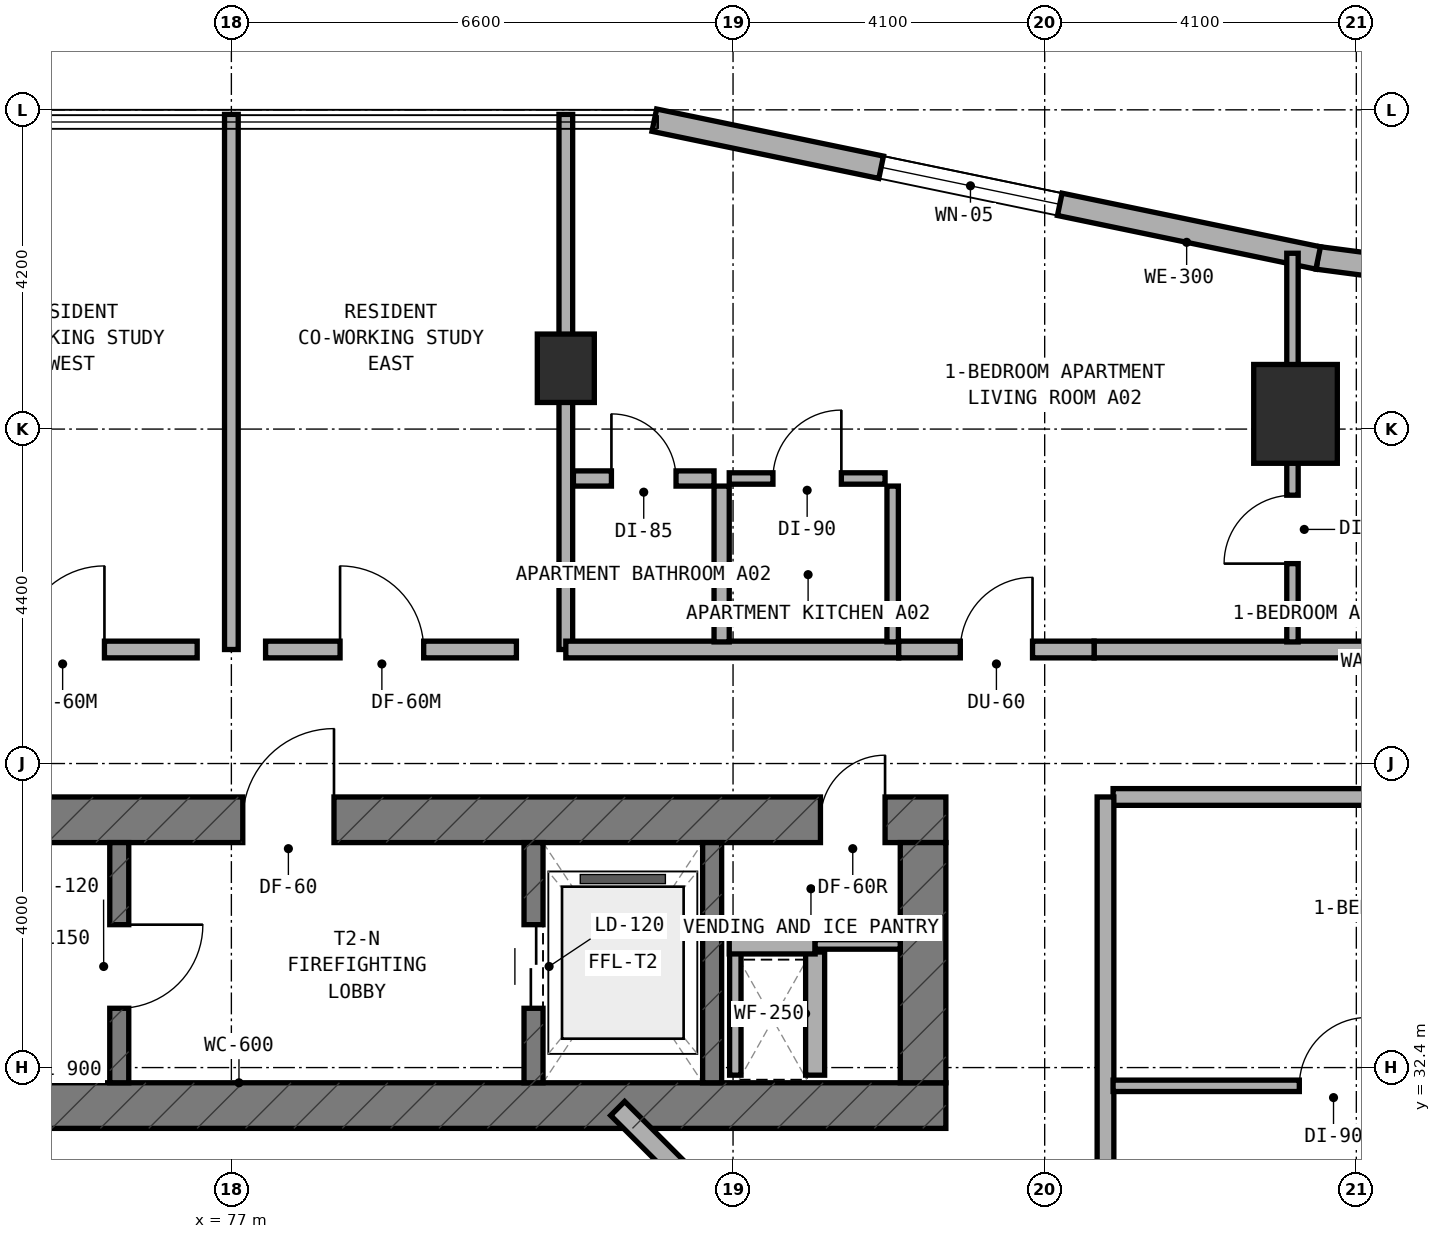
"""IFC4 building model, lengths in metres.
Left out: names, types, materials, properties, quantities, classifications, styles, units other than length and angle.
Written with IfcOpenShell. Run it as: python <this file> out.ifc"""

import sys

from ifc_helpers import new_model, si_unit, direction, frame, frame_2d, origin, origin_2d, place, context, subcontext, project, spatial, rectangle, extrude, element, fill, save


model = new_model("IFC4")
c1 = context("Model", 3, precision=1e-05, world=origin(), true_north=direction((0.0, 1.0)))
c2 = subcontext(c1, "Body", "Model", "MODEL_VIEW")
j1 = project(units=[si_unit("LENGTHUNIT", "METRE"), si_unit("PLANEANGLEUNIT", "RADIAN")], contexts=[c1])
p1 = place(None, origin())
s1 = spatial("IfcSite", under=j1, at=p1, CompositionType="ELEMENT")
p2 = place(p1, origin())
s2 = spatial("IfcBuilding", under=s1, at=p2, CompositionType="ELEMENT")
p3 = place(p2, frame((0.0, 0.0, 41.5)))
s3 = spatial("IfcBuildingStorey", under=s2, at=p3, CompositionType="ELEMENT", Elevation=41.5)
p4 = place(p3, frame((67.8, 31.9, 0.0), z_axis=(0.0, 0.0, 1.0), x_axis=(1.0, 0.0, 0.0)))
e1 = element("IfcWall", 1, at=p4, inside=s3, PredefinedType="SHEAR", context=c2, shape_type="SweptSolid", body=[
    extrude(rectangle(XDim=18.6, YDim=0.6, at=frame_2d((9.3, 0.0))), origin(), (0.0, 0.0, 1.0), 3.5),
])
p5 = place(p3, frame((67.8, 35.66, 0.0), z_axis=(0.0, 0.0, 1.0), x_axis=(1.0, 0.0, 0.0)))
e2 = element("IfcWall", 2, at=p5, inside=s3, PredefinedType="SHEAR", context=c2, shape_type="SweptSolid", body=[
    extrude(rectangle(XDim=18.6, YDim=0.6, at=frame_2d((9.3, 0.0))), origin(), (0.0, 0.0, 1.0), 3.5),
])
p6 = place(p5, frame((9.35, 0.0, 0.0)))
e3 = element("IfcOpeningElement", 3, at=p6, cuts=e2, PredefinedType="OPENING", context=c2, shape_type="SweptSolid", body=[
    extrude(rectangle(XDim=1.2, YDim=2.15, at=frame_2d((0.6, 1.075))), frame((0.0, 0.31, 0.0), z_axis=(0.0, -1.0, 0.0), x_axis=(1.0, 0.0, 0.0)), (0.0, 0.0, 1.0), 0.62),
])
p7 = place(p5, frame((16.95, 0.0, 0.0)))
e4 = element("IfcOpeningElement", 4, at=p7, cuts=e2, PredefinedType="OPENING", context=c2, shape_type="SweptSolid", body=[
    extrude(rectangle(XDim=0.85, YDim=2.1, at=frame_2d((0.425, 1.05))), frame((0.0, 0.31, 0.0), z_axis=(0.0, -1.0, 0.0), x_axis=(1.0, 0.0, 0.0)), (0.0, 0.0, 1.0), 0.62),
])
p8 = place(p3, frame((86.1, 32.2, 0.0), z_axis=(0.0, 0.0, 1.0), x_axis=(0.0, 1.0, 0.0)))
e5 = element("IfcWall", 5, at=p8, inside=s3, PredefinedType="SHEAR", context=c2, shape_type="SweptSolid", body=[
    extrude(rectangle(XDim=3.16, YDim=0.6, at=frame_2d((1.58, 0.0))), origin(), (0.0, 0.0, 1.0), 3.5),
])
p9 = place(p3, frame((75.525, 32.2, 0.0), z_axis=(0.0, 0.0, 1.0), x_axis=(0.0, 1.0, 0.0)))
e6 = element("IfcWall", 6, at=p9, inside=s3, PredefinedType="STANDARD", context=c2, shape_type="SweptSolid", body=[
    extrude(rectangle(XDim=3.16, YDim=0.25, at=frame_2d((1.58, 0.0))), origin(), (0.0, 0.0, 1.0), 3.25),
])
p10 = place(p9, frame((0.98, 0.0, 0.0)))
e7 = element("IfcOpeningElement", 7, at=p10, cuts=e6, PredefinedType="OPENING", context=c2, shape_type="SweptSolid", body=[
    extrude(rectangle(XDim=1.1, YDim=2.15, at=frame_2d((0.55, 1.075))), frame((0.0, 0.135, 0.0), z_axis=(0.0, -1.0, 0.0), x_axis=(1.0, 0.0, 0.0)), (0.0, 0.0, 1.0), 0.27),
])
p11 = place(p3, frame((80.975, 32.2, 0.0), z_axis=(0.0, 0.0, 1.0), x_axis=(0.0, 1.0, 0.0)))
e8 = element("IfcWall", 8, at=p11, inside=s3, PredefinedType="STANDARD", context=c2, shape_type="SweptSolid", body=[
    extrude(rectangle(XDim=3.16, YDim=0.25, at=frame_2d((1.58, 0.0))), origin(), (0.0, 0.0, 1.0), 3.25),
])
p12 = place(p11, frame((0.98, 0.0, 0.0)))
e9 = element("IfcOpeningElement", 9, at=p12, cuts=e8, PredefinedType="OPENING", context=c2, shape_type="SweptSolid", body=[
    extrude(rectangle(XDim=1.1, YDim=2.15, at=frame_2d((0.55, 1.075))), frame((0.0, 0.135, 0.0), z_axis=(0.0, -1.0, 0.0), x_axis=(1.0, 0.0, 0.0)), (0.0, 0.0, 1.0), 0.27),
])
p13 = place(p3, frame((83.325, 32.2, 0.0), z_axis=(0.0, 0.0, 1.0), x_axis=(0.0, 1.0, 0.0)))
e10 = element("IfcWall", 10, at=p13, inside=s3, PredefinedType="STANDARD", context=c2, shape_type="SweptSolid", body=[
    extrude(rectangle(XDim=3.16, YDim=0.25, at=frame_2d((1.58, 0.0))), origin(), (0.0, 0.0, 1.0), 3.25),
])
p14 = place(p3, frame((81.4, 41.6, 0.0), z_axis=(0.0, 0.0, 1.0), x_axis=(1.0, 0.0, 0.0)))
e11 = element("IfcColumn", 11, at=p14, inside=s3, PredefinedType="COLUMN", context=c2, shape_type="SweptSolid", body=[
    extrude(rectangle(XDim=0.75, YDim=0.9, at=origin_2d()), origin(), (0.0, 0.0, 1.0), 3.5),
])
p15 = place(p3, frame((91.0, 41.0, 0.0), z_axis=(0.0, 0.0, 1.0), x_axis=(1.0, 0.0, 0.0)))
e12 = element("IfcColumn", 12, at=p15, inside=s3, PredefinedType="COLUMN", context=c2, shape_type="SweptSolid", body=[
    extrude(rectangle(XDim=1.1, YDim=1.3, at=origin_2d()), origin(), (0.0, 0.0, 1.0), 3.5),
])
p16 = place(p3, frame((92.051, 42.953, 0.0), z_axis=(0.0, 0.0, 1.0), x_axis=(-0.991559404866, 0.129653178221, 0.0)))
e13 = element("IfcWall", 13, at=p16, inside=s3, PredefinedType="STANDARD", context=c2, shape_type="SweptSolid", body=[
    extrude(rectangle(XDim=0.764, YDim=0.3, at=frame_2d((0.382, 0.0))), origin(), (0.0, 0.0, 1.0), 3.25),
])
p17 = place(p3, frame((91.298, 43.051, 0.0), z_axis=(0.0, 0.0, 1.0), x_axis=(-0.979128391325, 0.203242695569, 0.0)))
e14 = element("IfcWall", 14, at=p17, inside=s3, PredefinedType="STANDARD", context=c2, shape_type="SweptSolid", body=[
    extrude(rectangle(XDim=8.92, YDim=0.3, at=frame_2d((4.46, 0.0))), origin(), (0.0, 0.0, 1.0), 3.25),
])
p18 = place(p17, frame((3.472, 0.0, 0.8)))
e15 = element("IfcOpeningElement", 15, at=p18, cuts=e14, PredefinedType="OPENING", context=c2, shape_type="SweptSolid", body=[
    extrude(rectangle(XDim=2.4, YDim=1.6, at=frame_2d((1.2, 0.8))), frame((0.0, 0.16, 0.0), z_axis=(0.0, -1.0, 0.0), x_axis=(1.0, 0.0, 0.0)), (0.0, 0.0, 1.0), 0.32),
])
p19 = place(p3, frame((83.716, 30.228, 0.0), z_axis=(0.0, 0.0, 1.0), x_axis=(-0.707106781187, 0.707106781187, 0.0)))
e16 = element("IfcWall", 16, at=p19, inside=s3, PredefinedType="STANDARD", context=c2, shape_type="SweptSolid", body=[
    extrude(rectangle(XDim=2.311, YDim=0.26, at=frame_2d((1.155, 0.0))), origin(), (0.0, 0.0, 1.0), 3.25),
])
p20 = place(p3, frame((83.63, 32.3, 0.0), z_axis=(0.0, 0.0, 1.0), x_axis=(0.0, 1.0, 0.0)))
e17 = element("IfcWall", 17, at=p20, inside=s3, PredefinedType="PARTITIONING", context=c2, shape_type="SweptSolid", body=[
    extrude(rectangle(XDim=1.62, YDim=0.15, at=frame_2d((0.81, 0.0))), origin(), (0.0, 0.0, 1.0), 2.725),
])
p21 = place(p3, frame((84.68, 32.3, 0.0), z_axis=(0.0, 0.0, 1.0), x_axis=(0.0, 1.0, 0.0)))
e18 = element("IfcWall", 18, at=p21, inside=s3, PredefinedType="SOLIDWALL", context=c2, shape_type="SweptSolid", body=[
    extrude(rectangle(XDim=1.62, YDim=0.25, at=frame_2d((0.81, 0.0))), origin(), (0.0, 0.0, 1.0), 3.22),
])
p22 = place(p3, frame((83.55, 34.02, 0.0), z_axis=(0.0, 0.0, 1.0), x_axis=(1.0, 0.0, 0.0)))
e19 = element("IfcWall", 19, at=p22, inside=s3, PredefinedType="SOLIDWALL", context=c2, shape_type="SweptSolid", body=[
    extrude(rectangle(XDim=1.13, YDim=0.25, at=frame_2d((0.565, 0.0))), origin(), (0.0, 0.0, 1.0), 3.22),
])
p23 = place(p3, frame((84.68, 34.02, 0.0), z_axis=(0.0, 0.0, 1.0), x_axis=(1.0, 0.0, 0.0)))
e20 = element("IfcWall", 20, at=p23, inside=s3, PredefinedType="PARTITIONING", context=c2, shape_type="SweptSolid", body=[
    extrude(rectangle(XDim=1.12, YDim=0.125, at=frame_2d((0.56, 0.0))), origin(), (0.0, 0.0, 1.0), 3.22),
])
p24 = place(p3, frame((77.0, 37.9, 0.0), z_axis=(0.0, 0.0, 1.0), x_axis=(0.0, 1.0, 0.0)))
e21 = element("IfcWall", 21, at=p24, inside=s3, PredefinedType="SOLIDWALL", context=c2, shape_type="SweptSolid", body=[
    extrude(rectangle(XDim=7.04, YDim=0.18, at=frame_2d((3.52, 0.0))), origin(), (0.0, 0.0, 1.0), 2.865),
])
p25 = place(p3, frame((73.25, 37.9, 0.0), z_axis=(0.0, 0.0, 1.0), x_axis=(1.0, 0.0, 0.0)))
e22 = element("IfcWall", 22, at=p25, inside=s3, PredefinedType="SOLIDWALL", context=c2, shape_type="SweptSolid", body=[
    extrude(rectangle(XDim=3.3, YDim=0.22, at=frame_2d((1.65, 0.0))), origin(), (0.0, 0.0, 1.0), 3.22),
])
p26 = place(p25, frame((0.98, 0.0, 0.0)))
e23 = element("IfcOpeningElement", 23, at=p26, cuts=e22, PredefinedType="OPENING", context=c2, shape_type="SweptSolid", body=[
    extrude(rectangle(XDim=1.1, YDim=2.1, at=frame_2d((0.55, 1.05))), frame((0.0, 0.12, 0.0), z_axis=(0.0, -1.0, 0.0), x_axis=(1.0, 0.0, 0.0)), (0.0, 0.0, 1.0), 0.24),
])
p27 = place(p3, frame((77.45, 37.9, 0.0), z_axis=(0.0, 0.0, 1.0), x_axis=(1.0, 0.0, 0.0)))
e24 = element("IfcWall", 24, at=p27, inside=s3, PredefinedType="SOLIDWALL", context=c2, shape_type="SweptSolid", body=[
    extrude(rectangle(XDim=3.3, YDim=0.22, at=frame_2d((1.65, 0.0))), origin(), (0.0, 0.0, 1.0), 3.22),
])
p28 = place(p27, frame((0.98, 0.0, 0.0)))
e25 = element("IfcOpeningElement", 25, at=p28, cuts=e24, PredefinedType="OPENING", context=c2, shape_type="SweptSolid", body=[
    extrude(rectangle(XDim=1.1, YDim=2.1, at=frame_2d((0.55, 1.05))), frame((0.0, 0.12, 0.0), z_axis=(0.0, -1.0, 0.0), x_axis=(1.0, 0.0, 0.0)), (0.0, 0.0, 1.0), 0.24),
])
p29 = place(p3, frame((81.4, 37.9, 0.0), z_axis=(0.0, 0.0, 1.0), x_axis=(0.0, 1.0, 0.0)))
e26 = element("IfcWall", 26, at=p29, inside=s3, PredefinedType="SOLIDWALL", context=c2, shape_type="SweptSolid", body=[
    extrude(rectangle(XDim=7.04, YDim=0.18, at=frame_2d((3.52, 0.0))), origin(), (0.0, 0.0, 1.0), 2.725),
])
p30 = place(p3, frame((81.4, 37.9, 0.0), z_axis=(0.0, 0.0, 1.0), x_axis=(1.0, 0.0, 0.0)))
e27 = element("IfcWall", 27, at=p30, inside=s3, PredefinedType="SOLIDWALL", context=c2, shape_type="SweptSolid", body=[
    extrude(rectangle(XDim=4.38, YDim=0.22, at=frame_2d((2.19, 0.0))), origin(), (0.0, 0.0, 1.0), 2.725),
])
p31 = place(p3, frame((88.35, 37.9, 0.0), z_axis=(0.0, 0.0, 1.0), x_axis=(1.0, 0.0, 0.0)))
e28 = element("IfcWall", 28, at=p31, inside=s3, PredefinedType="SOLIDWALL", context=c2, shape_type="SweptSolid", body=[
    extrude(rectangle(XDim=7.41, YDim=0.22, at=frame_2d((3.705, 0.0))), origin(), (0.0, 0.0, 1.0), 2.865),
])
p32 = place(p3, frame((85.78, 37.9, 0.0), z_axis=(0.0, 0.0, 1.0), x_axis=(1.0, 0.0, 0.0)))
e29 = element("IfcWall", 29, at=p32, inside=s3, PredefinedType="SOLIDWALL", context=c2, shape_type="SweptSolid", body=[
    extrude(rectangle(XDim=2.57, YDim=0.22, at=frame_2d((1.285, 0.0))), origin(), (0.0, 0.0, 1.0), 3.22),
])
p33 = place(p32, frame((0.81, 0.0, 0.0)))
e30 = element("IfcOpeningElement", 30, at=p33, cuts=e29, PredefinedType="OPENING", context=c2, shape_type="SweptSolid", body=[
    extrude(rectangle(XDim=0.95, YDim=2.1, at=frame_2d((0.475, 1.05))), frame((0.0, 0.12, 0.0), z_axis=(0.0, -1.0, 0.0), x_axis=(1.0, 0.0, 0.0)), (0.0, 0.0, 1.0), 0.24),
])
p34 = place(p3, frame((90.96, 38.0, 0.0), z_axis=(0.0, 0.0, 1.0), x_axis=(0.0, 1.0, 0.0)))
e31 = element("IfcWall", 31, at=p34, inside=s3, PredefinedType="PARTITIONING", context=c2, shape_type="SweptSolid", body=[
    extrude(rectangle(XDim=5.113, YDim=0.15, at=frame_2d((2.557, 0.0))), origin(), (0.0, 0.0, 1.0), 2.865),
])
p35 = place(p34, frame((1.03, 0.0, 0.0)))
e32 = element("IfcOpeningElement", 32, at=p35, cuts=e31, PredefinedType="OPENING", context=c2, shape_type="SweptSolid", body=[
    extrude(rectangle(XDim=0.9, YDim=2.1, at=frame_2d((0.45, 1.05))), frame((0.0, 0.085, 0.0), z_axis=(0.0, -1.0, 0.0), x_axis=(1.0, 0.0, 0.0)), (0.0, 0.0, 1.0), 0.17),
])
p36 = place(p3, frame((83.45, 38.0, 0.0), z_axis=(0.0, 0.0, 1.0), x_axis=(0.0, 1.0, 0.0)))
e33 = element("IfcWall", 33, at=p36, inside=s3, PredefinedType="PLUMBINGWALL", context=c2, shape_type="SweptSolid", body=[
    extrude(rectangle(XDim=2.05, YDim=0.2, at=frame_2d((1.025, 0.0))), origin(), (0.0, 0.0, 1.0), 3.22),
])
p37 = place(p3, frame((85.7, 38.0, 0.0), z_axis=(0.0, 0.0, 1.0), x_axis=(0.0, 1.0, 0.0)))
e34 = element("IfcWall", 34, at=p37, inside=s3, PredefinedType="PARTITIONING", context=c2, shape_type="SweptSolid", body=[
    extrude(rectangle(XDim=2.05, YDim=0.15, at=frame_2d((1.025, 0.0))), origin(), (0.0, 0.0, 1.0), 3.22),
])
p38 = place(p3, frame((81.5, 40.15, 0.0), z_axis=(0.0, 0.0, 1.0), x_axis=(1.0, 0.0, 0.0)))
e35 = element("IfcWall", 35, at=p38, inside=s3, PredefinedType="PLUMBINGWALL", context=c2, shape_type="SweptSolid", body=[
    extrude(rectangle(XDim=1.85, YDim=0.2, at=frame_2d((0.925, 0.0))), origin(), (0.0, 0.0, 1.0), 2.725),
])
p39 = place(p38, frame((0.5, 0.0, 0.0)))
e36 = element("IfcOpeningElement", 36, at=p39, cuts=e35, PredefinedType="OPENING", context=c2, shape_type="SweptSolid", body=[
    extrude(rectangle(XDim=0.85, YDim=2.1, at=frame_2d((0.425, 1.05))), frame((0.0, 0.11, 0.0), z_axis=(0.0, -1.0, 0.0), x_axis=(1.0, 0.0, 0.0)), (0.0, 0.0, 1.0), 0.22),
])
p40 = place(p3, frame((83.55, 40.15, 0.0), z_axis=(0.0, 0.0, 1.0), x_axis=(1.0, 0.0, 0.0)))
e37 = element("IfcWall", 37, at=p40, inside=s3, PredefinedType="PARTITIONING", context=c2, shape_type="SweptSolid", body=[
    extrude(rectangle(XDim=2.05, YDim=0.15, at=frame_2d((1.025, 0.0))), origin(), (0.0, 0.0, 1.0), 3.22),
])
p41 = place(p40, frame((0.575, 0.0, 0.0)))
e38 = element("IfcOpeningElement", 38, at=p41, cuts=e37, PredefinedType="OPENING", context=c2, shape_type="SweptSolid", body=[
    extrude(rectangle(XDim=0.9, YDim=2.1, at=frame_2d((0.45, 1.05))), frame((0.0, 0.085, 0.0), z_axis=(0.0, -1.0, 0.0), x_axis=(1.0, 0.0, 0.0)), (0.0, 0.0, 1.0), 0.17),
])
p42 = place(p3, frame((88.6, 35.96, 0.0), z_axis=(0.0, 0.0, 1.0), x_axis=(1.0, 0.0, 0.0)))
e39 = element("IfcWall", 39, at=p42, inside=s3, PredefinedType="SOLIDWALL", context=c2, shape_type="SweptSolid", body=[
    extrude(rectangle(XDim=7.0, YDim=0.22, at=frame_2d((3.5, 0.0))), origin(), (0.0, 0.0, 1.0), 2.865),
])
p43 = place(p3, frame((88.5, 26.4, 0.0), z_axis=(0.0, 0.0, 1.0), x_axis=(0.0, 1.0, 0.0)))
e40 = element("IfcWall", 40, at=p43, inside=s3, PredefinedType="SOLIDWALL", context=c2, shape_type="SweptSolid", body=[
    extrude(rectangle(XDim=9.56, YDim=0.22, at=frame_2d((4.78, 0.0))), origin(), (0.0, 0.0, 1.0), 2.725),
])
p44 = place(p43, frame((2.405, 0.0, 0.0)))
e41 = element("IfcOpeningElement", 41, at=p44, cuts=e40, PredefinedType="OPENING", context=c2, shape_type="SweptSolid", body=[
    extrude(rectangle(XDim=0.95, YDim=2.1, at=frame_2d((0.475, 1.05))), frame((0.0, 0.12, 0.0), z_axis=(0.0, -1.0, 0.0), x_axis=(1.0, 0.0, 0.0)), (0.0, 0.0, 1.0), 0.24),
])
p45 = place(p3, frame((88.6, 32.16, 0.0), z_axis=(0.0, 0.0, 1.0), x_axis=(1.0, 0.0, 0.0)))
e42 = element("IfcWall", 42, at=p45, inside=s3, PredefinedType="PARTITIONING", context=c2, shape_type="SweptSolid", body=[
    extrude(rectangle(XDim=7.06, YDim=0.15, at=frame_2d((3.53, 0.0))), origin(), (0.0, 0.0, 1.0), 2.865),
])
p46 = place(p45, frame((2.45, 0.0, 0.0)))
e43 = element("IfcOpeningElement", 43, at=p46, cuts=e42, PredefinedType="OPENING", context=c2, shape_type="SweptSolid", body=[
    extrude(rectangle(XDim=0.9, YDim=2.1, at=frame_2d((0.45, 1.05))), frame((0.0, 0.085, 0.0), z_axis=(0.0, -1.0, 0.0), x_axis=(1.0, 0.0, 0.0)), (0.0, 0.0, 1.0), 0.17),
])
p47 = place(p18, origin())
e44 = element("IfcWindow", 44, at=p47, inside=s3, PartitioningType="SINGLE_PANEL", PredefinedType="WINDOW", context=c2, shape_type="SweptSolid", body=[
    extrude(rectangle(XDim=2.4, YDim=1.6, at=frame_2d((1.2, 0.8))), frame((0.0, 0.03, 0.0), z_axis=(0.0, -1.0, 0.0), x_axis=(1.0, 0.0, 0.0)), (0.0, 0.0, 1.0), 0.06),
])
fill(e15, e44)
p48 = place(p10, frame((1.1, 0.0, 0.0), z_axis=(0.0, 0.0, 1.0), x_axis=(-1.0, 0.0, 0.0)))
e45 = element("IfcDoor", 45, at=p48, inside=s3, OperationType="SINGLE_SWING_LEFT", PredefinedType="DOOR", context=c2, shape_type="SweptSolid", body=[
    extrude(rectangle(XDim=1.1, YDim=2.15, at=frame_2d((0.55, 1.075))), frame((0.0, 0.025, 0.0), z_axis=(0.0, -1.0, 0.0), x_axis=(1.0, 0.0, 0.0)), (0.0, 0.0, 1.0), 0.05),
])
fill(e7, e45)
p49 = place(p6, origin())
e46 = element("IfcDoor", 46, at=p49, inside=s3, OperationType="SINGLE_SWING_RIGHT", PredefinedType="DOOR", context=c2, shape_type="SweptSolid", body=[
    extrude(rectangle(XDim=1.2, YDim=2.15, at=frame_2d((0.6, 1.075))), frame((0.0, 0.025, 0.0), z_axis=(0.0, -1.0, 0.0), x_axis=(1.0, 0.0, 0.0)), (0.0, 0.0, 1.0), 0.05),
])
fill(e3, e46)
p50 = place(p12, origin())
e47 = element("IfcDoor", 47, at=p50, inside=s3, OperationType="DOUBLE_DOOR_SLIDING", PredefinedType="DOOR", context=c2, shape_type="SweptSolid", body=[
    extrude(rectangle(XDim=1.1, YDim=2.15, at=frame_2d((0.55, 1.075))), frame((0.0, 0.025, 0.0), z_axis=(0.0, -1.0, 0.0), x_axis=(1.0, 0.0, 0.0)), (0.0, 0.0, 1.0), 0.05),
])
fill(e9, e47)
p51 = place(p7, origin())
e48 = element("IfcDoor", 48, at=p51, inside=s3, OperationType="SINGLE_SWING_RIGHT", PredefinedType="DOOR", context=c2, shape_type="SweptSolid", body=[
    extrude(rectangle(XDim=0.85, YDim=2.1, at=frame_2d((0.425, 1.05))), frame((0.0, 0.025, 0.0), z_axis=(0.0, -1.0, 0.0), x_axis=(1.0, 0.0, 0.0)), (0.0, 0.0, 1.0), 0.05),
])
fill(e4, e48)
p52 = place(p26, origin())
e49 = element("IfcDoor", 49, at=p52, inside=s3, OperationType="SINGLE_SWING_RIGHT", PredefinedType="DOOR", context=c2, shape_type="SweptSolid", body=[
    extrude(rectangle(XDim=1.1, YDim=2.1, at=frame_2d((0.55, 1.05))), frame((0.0, 0.025, 0.0), z_axis=(0.0, -1.0, 0.0), x_axis=(1.0, 0.0, 0.0)), (0.0, 0.0, 1.0), 0.05),
])
fill(e23, e49)
p53 = place(p28, origin())
e50 = element("IfcDoor", 50, at=p53, inside=s3, OperationType="SINGLE_SWING_LEFT", PredefinedType="DOOR", context=c2, shape_type="SweptSolid", body=[
    extrude(rectangle(XDim=1.1, YDim=2.1, at=frame_2d((0.55, 1.05))), frame((0.0, 0.025, 0.0), z_axis=(0.0, -1.0, 0.0), x_axis=(1.0, 0.0, 0.0)), (0.0, 0.0, 1.0), 0.05),
])
fill(e25, e50)
p54 = place(p33, origin())
e51 = element("IfcDoor", 51, at=p54, inside=s3, OperationType="SINGLE_SWING_RIGHT", PredefinedType="DOOR", context=c2, shape_type="SweptSolid", body=[
    extrude(rectangle(XDim=0.95, YDim=2.1, at=frame_2d((0.475, 1.05))), frame((0.0, 0.025, 0.0), z_axis=(0.0, -1.0, 0.0), x_axis=(1.0, 0.0, 0.0)), (0.0, 0.0, 1.0), 0.05),
])
fill(e30, e51)
p55 = place(p35, origin())
e52 = element("IfcDoor", 52, at=p55, inside=s3, OperationType="SINGLE_SWING_LEFT", PredefinedType="DOOR", context=c2, shape_type="SweptSolid", body=[
    extrude(rectangle(XDim=0.9, YDim=2.1, at=frame_2d((0.45, 1.05))), frame((0.0, 0.025, 0.0), z_axis=(0.0, -1.0, 0.0), x_axis=(1.0, 0.0, 0.0)), (0.0, 0.0, 1.0), 0.05),
])
fill(e32, e52)
p56 = place(p39, origin())
e53 = element("IfcDoor", 53, at=p56, inside=s3, OperationType="SINGLE_SWING_LEFT", PredefinedType="DOOR", context=c2, shape_type="SweptSolid", body=[
    extrude(rectangle(XDim=0.85, YDim=2.1, at=frame_2d((0.425, 1.05))), frame((0.0, 0.025, 0.0), z_axis=(0.0, -1.0, 0.0), x_axis=(1.0, 0.0, 0.0)), (0.0, 0.0, 1.0), 0.05),
])
fill(e36, e53)
p57 = place(p41, origin())
e54 = element("IfcDoor", 54, at=p57, inside=s3, OperationType="SINGLE_SWING_RIGHT", PredefinedType="DOOR", context=c2, shape_type="SweptSolid", body=[
    extrude(rectangle(XDim=0.9, YDim=2.1, at=frame_2d((0.45, 1.05))), frame((0.0, 0.025, 0.0), z_axis=(0.0, -1.0, 0.0), x_axis=(1.0, 0.0, 0.0)), (0.0, 0.0, 1.0), 0.05),
])
fill(e38, e54)
p58 = place(p46, origin())
e55 = element("IfcDoor", 55, at=p58, inside=s3, OperationType="SINGLE_SWING_RIGHT", PredefinedType="DOOR", context=c2, shape_type="SweptSolid", body=[
    extrude(rectangle(XDim=0.9, YDim=2.1, at=frame_2d((0.45, 1.05))), frame((0.0, 0.025, 0.0), z_axis=(0.0, -1.0, 0.0), x_axis=(1.0, 0.0, 0.0)), (0.0, 0.0, 1.0), 0.05),
])
fill(e43, e55)
save(model, sys.argv[1])
